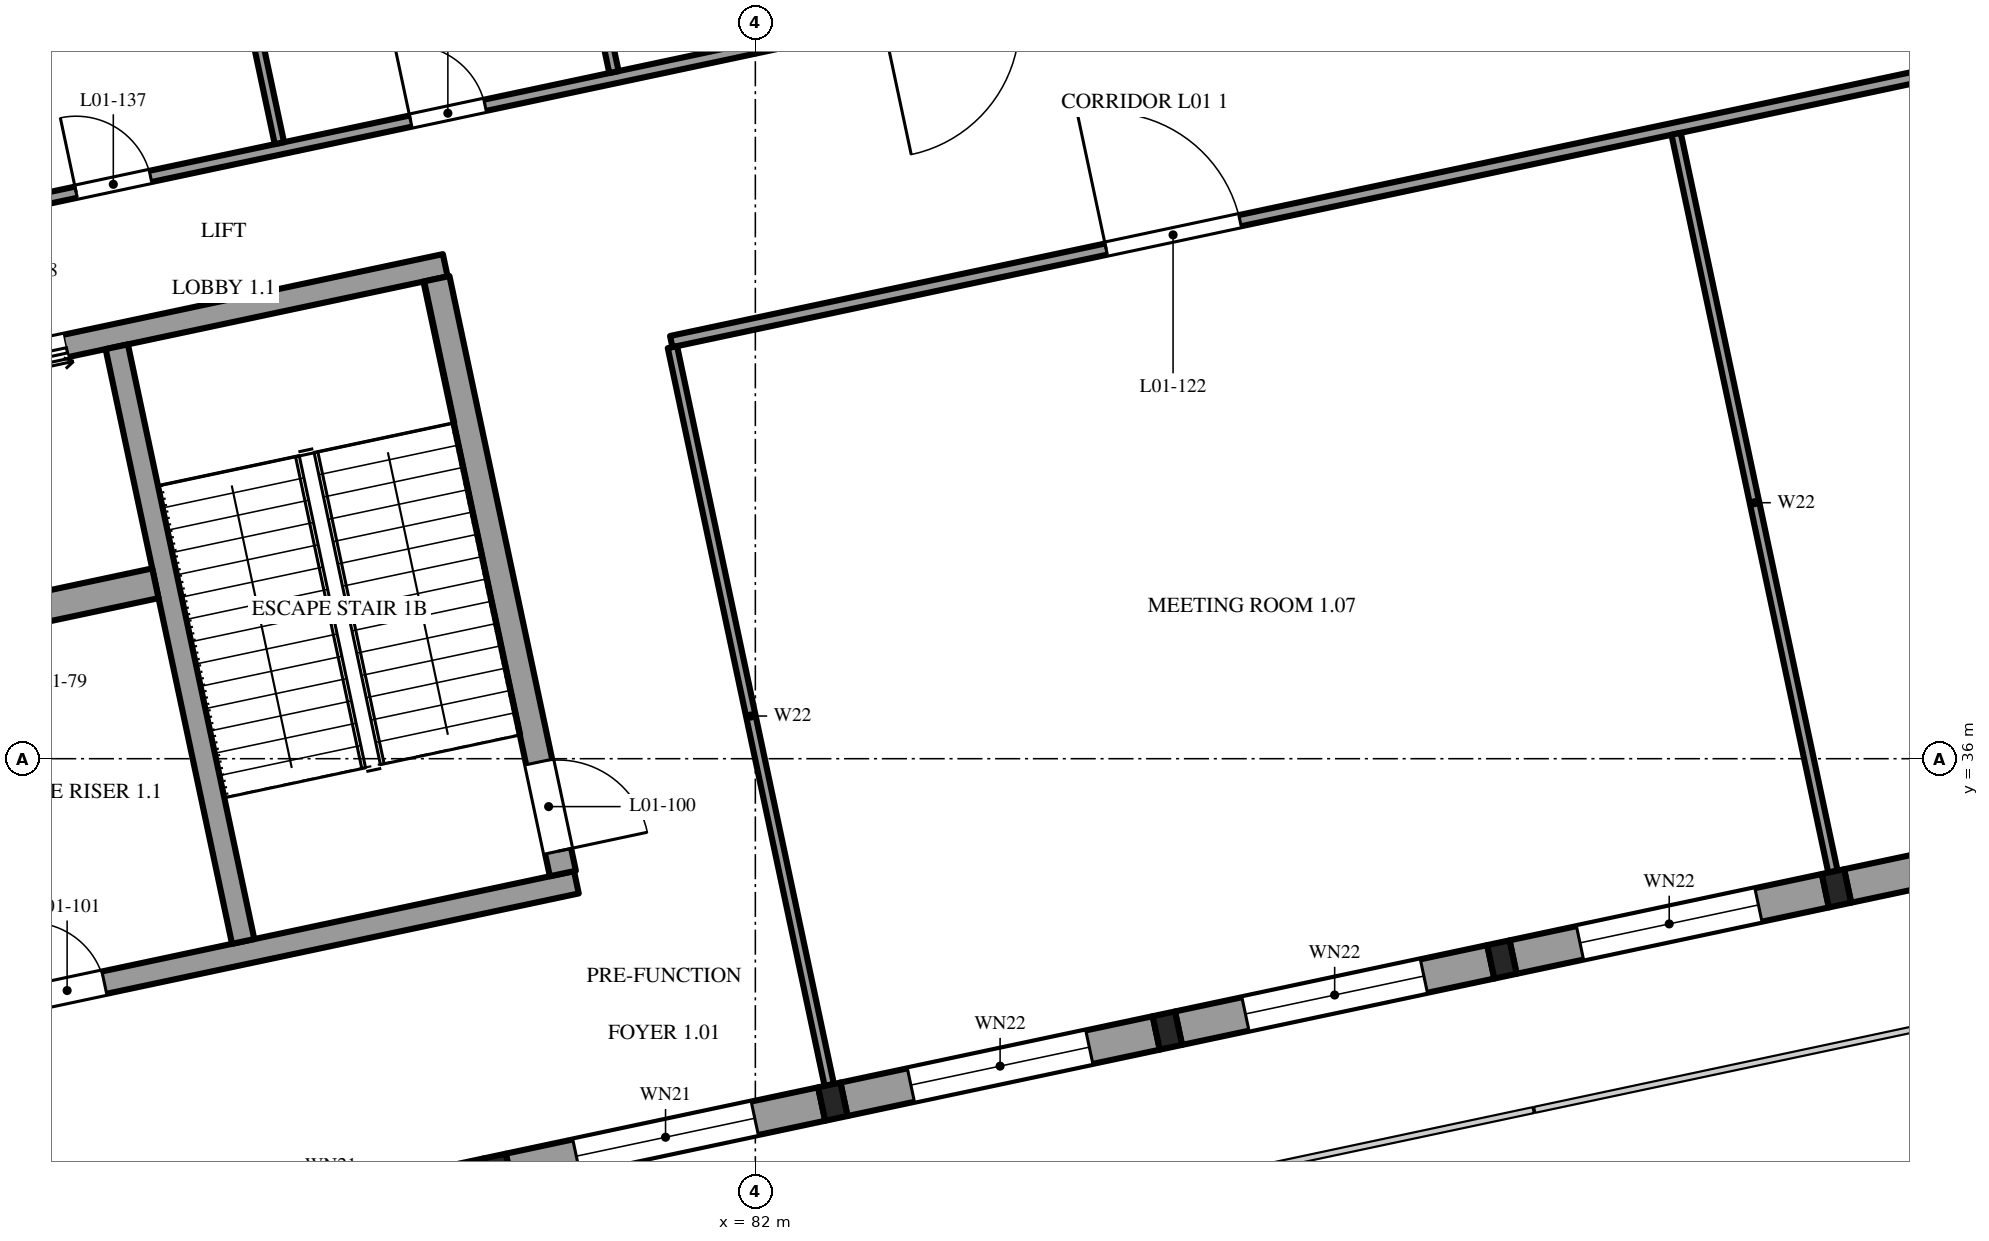
"""IFC4 building model, lengths in metres.
Left out: names, types, materials, properties, quantities, classifications, styles, units other than length and angle.
Written with IfcOpenShell. Run it as: python <this file> out.ifc"""

import sys

from ifc_helpers import new_model, si_unit, direction, frame, frame_2d, origin, origin_2d, place, context, subcontext, project, spatial, rectangle, i_section, extrude, element, fill, save


model = new_model("IFC4")
c1 = context("Model", 3, precision=1e-05, world=origin(), true_north=direction((0.0, 1.0)))
c2 = subcontext(c1, "Body", "Model", "MODEL_VIEW")
j1 = project(units=[si_unit("LENGTHUNIT", "METRE"), si_unit("PLANEANGLEUNIT", "RADIAN")], contexts=[c1])
p1 = place(None, origin())
s1 = spatial("IfcSite", under=j1, at=p1, CompositionType="ELEMENT")
p2 = place(p1, origin())
s2 = spatial("IfcBuilding", under=s1, at=p2, CompositionType="ELEMENT")
p3 = place(p2, frame((0.0, 0.0, 7.2)))
s3 = spatial("IfcBuildingStorey", under=s2, at=p3, CompositionType="ELEMENT", Elevation=7.2)
for number, where, z_axis, x_axis in (
    (1, (78.618, 30.552, 0.0), (0.0, 0.0, 1.0), (0.978, 0.208, 0.0)),
    (2, (83.019, 31.487, 0.0), (0.0, 0.0, 1.0), (0.978, 0.208, 0.0)),
    (3, (87.421, 32.423, 0.0), (0.0, 0.0, 1.0), (0.978, 0.208, 0.0)),
    (4, (91.823, 33.358, 0.0), (0.0, 0.0, 1.0), (0.978, 0.208, 0.0)),
    (5, (96.224, 34.294, 0.0), (0.0, 0.0, 1.0), (0.978, 0.208, 0.0)),
):
    element("IfcColumn", number, at=place(p3, frame(where, z_axis=z_axis, x_axis=x_axis)), inside=s3, PredefinedType="COLUMN", context=c2, shape_type="SweptSolid", body=[
        extrude(i_section(OverallWidth=0.3, OverallDepth=0.45, WebThickness=0.014, FlangeThickness=0.026, FilletRadius=0.027, at=origin_2d()), origin(), (0.0, 0.0, 1.0), 4.8),
    ])
p4 = place(p3, frame((66.245, 31.525, 0.0), z_axis=(0.0, 0.0, 1.0), x_axis=(0.978147662755, 0.20791139903, 0.0)))
e6 = element("IfcWall", 6, at=p4, inside=s3, PredefinedType="SHEAR", context=c2, shape_type="SweptSolid", body=[
    extrude(rectangle(XDim=13.7, YDim=0.3, at=frame_2d((6.85, 0.0))), origin(), (0.0, 0.0, 1.0), 4.8),
])
p5 = place(p4, frame((6.35, 0.0, 0.0)))
e7 = element("IfcOpeningElement", 7, at=p5, cuts=e6, PredefinedType="OPENING", context=c2, shape_type="SweptSolid", body=[
    extrude(rectangle(XDim=1.0, YDim=2.1, at=frame_2d((0.5, 1.05))), frame((0.0, 0.16, 0.0), z_axis=(0.0, -1.0, 0.0), x_axis=(1.0, 0.0, 0.0)), (0.0, 0.0, 1.0), 0.32),
])
p6 = place(p3, frame((64.519, 39.644, 0.0), z_axis=(0.0, 0.0, 1.0), x_axis=(0.978147662755, 0.20791139903, 0.0)))
e8 = element("IfcWall", 8, at=p6, inside=s3, PredefinedType="SHEAR", context=c2, shape_type="SweptSolid", body=[
    extrude(rectangle(XDim=13.7, YDim=0.3, at=frame_2d((6.85, 0.0))), origin(), (0.0, 0.0, 1.0), 4.8),
])
p7 = place(p6, frame((5.1, 0.0, 0.0)))
e9 = element("IfcOpeningElement", 9, at=p7, cuts=e8, PredefinedType="OPENING", context=c2, shape_type="SweptSolid", body=[
    extrude(rectangle(XDim=1.1, YDim=2.1, at=frame_2d((0.55, 1.05))), frame((0.0, 0.16, 0.0), z_axis=(0.0, -1.0, 0.0), x_axis=(1.0, 0.0, 0.0)), (0.0, 0.0, 1.0), 0.32),
])
p8 = place(p6, frame((7.5, 0.0, 0.0)))
e10 = element("IfcOpeningElement", 10, at=p8, cuts=e8, PredefinedType="OPENING", context=c2, shape_type="SweptSolid", body=[
    extrude(rectangle(XDim=1.1, YDim=2.1, at=frame_2d((0.55, 1.05))), frame((0.0, 0.16, 0.0), z_axis=(0.0, -1.0, 0.0), x_axis=(1.0, 0.0, 0.0)), (0.0, 0.0, 1.0), 0.32),
])
p9 = place(p3, frame((79.468, 34.49, 0.0), z_axis=(0.0, 0.0, 1.0), x_axis=(-0.207915693476, 0.978146749934, 0.0)))
e11 = element("IfcWall", 11, at=p9, inside=s3, PredefinedType="SOLIDWALL", context=c2, shape_type="SweptSolid", body=[
    extrude(rectangle(XDim=8.0, YDim=0.35, at=frame_2d((4.0, 0.0))), origin(), (0.0, 0.0, 1.0), 4.8),
])
p10 = place(p9, frame((0.3, 0.0, 0.0)))
e12 = element("IfcOpeningElement", 12, at=p10, cuts=e11, PredefinedType="OPENING", context=c2, shape_type="SweptSolid", body=[
    extrude(rectangle(XDim=1.2, YDim=2.1, at=frame_2d((0.6, 1.05))), frame((0.0, 0.185, 0.0), z_axis=(0.0, -1.0, 0.0), x_axis=(1.0, 0.0, 0.0)), (0.0, 0.0, 1.0), 0.37),
])
p11 = place(p3, frame((75.261, 33.595, 0.0), z_axis=(0.0, 0.0, 1.0), x_axis=(-0.207915693476, 0.978146749934, 0.0)))
e13 = element("IfcWall", 13, at=p11, inside=s3, PredefinedType="SHEAR", context=c2, shape_type="SweptSolid", body=[
    extrude(rectangle(XDim=8.0, YDim=0.3, at=frame_2d((4.0, 0.0))), origin(), (0.0, 0.0, 1.0), 4.8),
])
p12 = place(p3, frame((69.705, 37.373, 0.0), z_axis=(0.0, 0.0, 1.0), x_axis=(0.978149611564, 0.20790223038, 0.0)))
e14 = element("IfcWall", 14, at=p12, inside=s3, PredefinedType="SHEAR", context=c2, shape_type="SweptSolid", body=[
    extrude(rectangle(XDim=4.5, YDim=0.4, at=frame_2d((2.25, 0.0))), origin(), (0.0, 0.0, 1.0), 4.8),
])
p13 = place(p3, frame((74.363, 29.647, 0.0), z_axis=(0.0, 0.0, 1.0), x_axis=(0.978143927149, 0.207928972925, 0.0)))
e15 = element("IfcWall", 15, at=p13, inside=s3, PredefinedType="SOLIDWALL", context=c2, shape_type="SweptSolid", body=[
    extrude(rectangle(XDim=4.2, YDim=0.45, at=frame_2d((2.1, 0.0))), origin(), (0.0, 0.0, 1.0), 4.35),
])
p14 = place(p13, frame((0.9, 0.0, 0.45)))
e16 = element("IfcOpeningElement", 16, at=p14, cuts=e15, PredefinedType="OPENING", context=c2, shape_type="SweptSolid", body=[
    extrude(rectangle(XDim=2.4, YDim=3.3, at=frame_2d((1.2, 1.65))), frame((0.0, 0.235, 0.0), z_axis=(0.0, -1.0, 0.0), x_axis=(1.0, 0.0, 0.0)), (0.0, 0.0, 1.0), 0.47),
])
p15 = place(p3, frame((78.764, 30.583, 0.0), z_axis=(0.0, 0.0, 1.0), x_axis=(0.978143927149, 0.207928972925, 0.0)))
e17 = element("IfcWall", 17, at=p15, inside=s3, PredefinedType="SOLIDWALL", context=c2, shape_type="SweptSolid", body=[
    extrude(rectangle(XDim=4.2, YDim=0.45, at=frame_2d((2.1, 0.0))), origin(), (0.0, 0.0, 1.0), 4.35),
])
p16 = place(p15, frame((0.9, 0.0, 0.45)))
e18 = element("IfcOpeningElement", 18, at=p16, cuts=e17, PredefinedType="OPENING", context=c2, shape_type="SweptSolid", body=[
    extrude(rectangle(XDim=2.4, YDim=3.3, at=frame_2d((1.2, 1.65))), frame((0.0, 0.235, 0.0), z_axis=(0.0, -1.0, 0.0), x_axis=(1.0, 0.0, 0.0)), (0.0, 0.0, 1.0), 0.47),
])
p17 = place(p3, frame((83.166, 31.519, 0.0), z_axis=(0.0, 0.0, 1.0), x_axis=(0.978155748334, 0.207873355681, 0.0)))
e19 = element("IfcWall", 19, at=p17, inside=s3, PredefinedType="SOLIDWALL", context=c2, shape_type="SweptSolid", body=[
    extrude(rectangle(XDim=4.2, YDim=0.45, at=frame_2d((2.1, 0.0))), origin(), (0.0, 0.0, 1.0), 4.35),
])
p18 = place(p17, frame((0.9, 0.0, 0.9)))
e20 = element("IfcOpeningElement", 20, at=p18, cuts=e19, PredefinedType="OPENING", context=c2, shape_type="SweptSolid", body=[
    extrude(rectangle(XDim=2.4, YDim=2.4, at=frame_2d((1.2, 1.2))), frame((0.0, 0.235, 0.0), z_axis=(0.0, -1.0, 0.0), x_axis=(1.0, 0.0, 0.0)), (0.0, 0.0, 1.0), 0.47),
])
p19 = place(p3, frame((87.568, 32.454, 0.0), z_axis=(0.0, 0.0, 1.0), x_axis=(0.97815826, 0.207861536591, 0.0)))
e21 = element("IfcWall", 21, at=p19, inside=s3, PredefinedType="SOLIDWALL", context=c2, shape_type="SweptSolid", body=[
    extrude(rectangle(XDim=4.2, YDim=0.45, at=frame_2d((2.1, 0.0))), origin(), (0.0, 0.0, 1.0), 4.35),
])
p20 = place(p19, frame((0.9, 0.0, 0.9)))
e22 = element("IfcOpeningElement", 22, at=p20, cuts=e21, PredefinedType="OPENING", context=c2, shape_type="SweptSolid", body=[
    extrude(rectangle(XDim=2.4, YDim=2.4, at=frame_2d((1.2, 1.2))), frame((0.0, 0.235, 0.0), z_axis=(0.0, -1.0, 0.0), x_axis=(1.0, 0.0, 0.0)), (0.0, 0.0, 1.0), 0.47),
])
p21 = place(p3, frame((91.969, 33.39, 0.0), z_axis=(0.0, 0.0, 1.0), x_axis=(0.978143927149, 0.207928972925, 0.0)))
e23 = element("IfcWall", 23, at=p21, inside=s3, PredefinedType="SOLIDWALL", context=c2, shape_type="SweptSolid", body=[
    extrude(rectangle(XDim=4.2, YDim=0.45, at=frame_2d((2.1, 0.0))), origin(), (0.0, 0.0, 1.0), 4.35),
])
p22 = place(p21, frame((0.9, 0.0, 0.9)))
e24 = element("IfcOpeningElement", 24, at=p22, cuts=e23, PredefinedType="OPENING", context=c2, shape_type="SweptSolid", body=[
    extrude(rectangle(XDim=2.4, YDim=2.4, at=frame_2d((1.2, 1.2))), frame((0.0, 0.235, 0.0), z_axis=(0.0, -1.0, 0.0), x_axis=(1.0, 0.0, 0.0)), (0.0, 0.0, 1.0), 0.47),
])
p23 = place(p3, frame((96.371, 34.325, 0.0), z_axis=(0.0, 0.0, 1.0), x_axis=(0.978143927149, 0.207928972925, 0.0)))
e25 = element("IfcWall", 25, at=p23, inside=s3, PredefinedType="SOLIDWALL", context=c2, shape_type="SweptSolid", body=[
    extrude(rectangle(XDim=4.2, YDim=0.45, at=frame_2d((2.1, 0.0))), origin(), (0.0, 0.0, 1.0), 4.35),
])
p24 = place(p23, frame((0.9, 0.0, 0.9)))
e26 = element("IfcOpeningElement", 26, at=p24, cuts=e25, PredefinedType="OPENING", context=c2, shape_type="SweptSolid", body=[
    extrude(rectangle(XDim=2.4, YDim=2.4, at=frame_2d((1.2, 1.2))), frame((0.0, 0.235, 0.0), z_axis=(0.0, -1.0, 0.0), x_axis=(1.0, 0.0, 0.0)), (0.0, 0.0, 1.0), 0.47),
])
p25 = place(p3, frame((80.893, 41.489, 0.0), z_axis=(0.0, 0.0, 1.0), x_axis=(0.97814724207, 0.20791337819, 0.0)))
e27 = element("IfcWall", 27, at=p25, inside=s3, PredefinedType="PARTITIONING", context=c2, shape_type="SweptSolid", body=[
    extrude(rectangle(XDim=49.5, YDim=0.15, at=frame_2d((24.75, 0.0))), origin(), (0.0, 0.0, 1.0), 3.75),
])
p26 = place(p25, frame((5.85, 0.0, 0.0)))
e28 = element("IfcOpeningElement", 28, at=p26, cuts=e27, PredefinedType="OPENING", context=c2, shape_type="SweptSolid", body=[
    extrude(rectangle(XDim=1.8, YDim=2.1, at=frame_2d((0.9, 1.05))), frame((0.0, 0.085, 0.0), z_axis=(0.0, -1.0, 0.0), x_axis=(1.0, 0.0, 0.0)), (0.0, 0.0, 1.0), 0.17),
])
p27 = place(p25, frame((17.1, 0.0, 0.0)))
e29 = element("IfcOpeningElement", 29, at=p27, cuts=e27, PredefinedType="OPENING", context=c2, shape_type="SweptSolid", body=[
    extrude(rectangle(XDim=1.8, YDim=2.1, at=frame_2d((0.9, 1.05))), frame((0.0, 0.085, 0.0), z_axis=(0.0, -1.0, 0.0), x_axis=(1.0, 0.0, 0.0)), (0.0, 0.0, 1.0), 0.17),
])
p28 = place(p25, frame((26.1, 0.0, 0.0)))
e30 = element("IfcOpeningElement", 30, at=p28, cuts=e27, PredefinedType="OPENING", context=c2, shape_type="SweptSolid", body=[
    extrude(rectangle(XDim=1.8, YDim=2.1, at=frame_2d((0.9, 1.05))), frame((0.0, 0.085, 0.0), z_axis=(0.0, -1.0, 0.0), x_axis=(1.0, 0.0, 0.0)), (0.0, 0.0, 1.0), 0.17),
])
p29 = place(p25, frame((33.25, 0.0, 0.0)))
e31 = element("IfcOpeningElement", 31, at=p29, cuts=e27, PredefinedType="OPENING", context=c2, shape_type="SweptSolid", body=[
    extrude(rectangle(XDim=1.0, YDim=2.1, at=frame_2d((0.5, 1.05))), frame((0.0, 0.085, 0.0), z_axis=(0.0, -1.0, 0.0), x_axis=(1.0, 0.0, 0.0)), (0.0, 0.0, 1.0), 0.17),
])
p30 = place(p25, frame((41.7, 0.0, 0.0)))
e32 = element("IfcOpeningElement", 32, at=p30, cuts=e27, PredefinedType="OPENING", context=c2, shape_type="SweptSolid", body=[
    extrude(rectangle(XDim=2.1, YDim=2.4, at=frame_2d((1.05, 1.2))), frame((0.0, 0.085, 0.0), z_axis=(0.0, -1.0, 0.0), x_axis=(1.0, 0.0, 0.0)), (0.0, 0.0, 1.0), 0.17),
])
p31 = place(p3, frame((82.972, 31.707, 0.0), z_axis=(0.0, 0.0, 1.0), x_axis=(-0.207904355568, 0.978149159861, 0.0)))
e33 = element("IfcWall", 33, at=p31, inside=s3, PredefinedType="PARTITIONING", context=c2, shape_type="SweptSolid", body=[
    extrude(rectangle(XDim=9.925, YDim=0.125, at=frame_2d((4.962, 0.0))), origin(), (0.0, 0.0, 1.0), 3.75),
])
p32 = place(p3, frame((96.177, 34.514, 0.0), z_axis=(0.0, 0.0, 1.0), x_axis=(-0.20790935802, 0.978148096582, 0.0)))
e34 = element("IfcWall", 34, at=p32, inside=s3, PredefinedType="PARTITIONING", context=c2, shape_type="SweptSolid", body=[
    extrude(rectangle(XDim=9.925, YDim=0.125, at=frame_2d((4.962, 0.0))), origin(), (0.0, 0.0, 1.0), 3.75),
])
p33 = place(p3, frame((59.663, 40.605, 0.0), z_axis=(0.0, 0.0, 1.0), x_axis=(0.978147466509, 0.207912322295, 0.0)))
e35 = element("IfcWall", 35, at=p33, inside=s3, PredefinedType="PARTITIONING", context=c2, shape_type="SweptSolid", body=[
    extrude(rectangle(XDim=34.45, YDim=0.15, at=frame_2d((17.225, 0.0))), origin(), (0.0, 0.0, 1.0), 3.75),
])
p34 = place(p33, frame((2.975, 0.0, 0.0)))
e36 = element("IfcOpeningElement", 36, at=p34, cuts=e35, PredefinedType="OPENING", context=c2, shape_type="SweptSolid", body=[
    extrude(rectangle(XDim=1.5, YDim=2.1, at=frame_2d((0.75, 1.05))), frame((0.0, 0.085, 0.0), z_axis=(0.0, -1.0, 0.0), x_axis=(1.0, 0.0, 0.0)), (0.0, 0.0, 1.0), 0.17),
])
p35 = place(p33, frame((9.2, 0.0, 0.0)))
e37 = element("IfcOpeningElement", 37, at=p35, cuts=e35, PredefinedType="OPENING", context=c2, shape_type="SweptSolid", body=[
    extrude(rectangle(XDim=1.0, YDim=2.1, at=frame_2d((0.5, 1.05))), frame((0.0, 0.085, 0.0), z_axis=(0.0, -1.0, 0.0), x_axis=(1.0, 0.0, 0.0)), (0.0, 0.0, 1.0), 0.17),
])
p36 = place(p33, frame((13.7, 0.0, 0.0)))
e38 = element("IfcOpeningElement", 38, at=p36, cuts=e35, PredefinedType="OPENING", context=c2, shape_type="SweptSolid", body=[
    extrude(rectangle(XDim=1.0, YDim=2.1, at=frame_2d((0.5, 1.05))), frame((0.0, 0.085, 0.0), z_axis=(0.0, -1.0, 0.0), x_axis=(1.0, 0.0, 0.0)), (0.0, 0.0, 1.0), 0.17),
])
p37 = place(p33, frame((18.2, 0.0, 0.0)))
e39 = element("IfcOpeningElement", 39, at=p37, cuts=e35, PredefinedType="OPENING", context=c2, shape_type="SweptSolid", body=[
    extrude(rectangle(XDim=1.0, YDim=2.1, at=frame_2d((0.5, 1.05))), frame((0.0, 0.085, 0.0), z_axis=(0.0, -1.0, 0.0), x_axis=(1.0, 0.0, 0.0)), (0.0, 0.0, 1.0), 0.17),
])
p38 = place(p33, frame((24.55, 0.0, 0.0)))
e40 = element("IfcOpeningElement", 40, at=p38, cuts=e35, PredefinedType="OPENING", context=c2, shape_type="SweptSolid", body=[
    extrude(rectangle(XDim=1.8, YDim=2.1, at=frame_2d((0.9, 1.05))), frame((0.0, 0.085, 0.0), z_axis=(0.0, -1.0, 0.0), x_axis=(1.0, 0.0, 0.0)), (0.0, 0.0, 1.0), 0.17),
])
p39 = place(p33, frame((31.7, 0.0, 0.0)))
e41 = element("IfcOpeningElement", 41, at=p39, cuts=e35, PredefinedType="OPENING", context=c2, shape_type="SweptSolid", body=[
    extrude(rectangle(XDim=1.0, YDim=2.1, at=frame_2d((0.5, 1.05))), frame((0.0, 0.085, 0.0), z_axis=(0.0, -1.0, 0.0), x_axis=(1.0, 0.0, 0.0)), (0.0, 0.0, 1.0), 0.17),
])
p40 = place(p3, frame((73.675, 53.807, 0.0), z_axis=(0.0, 0.0, 1.0), x_axis=(0.207904355568, -0.978149159861, 0.0)))
e42 = element("IfcWall", 42, at=p40, inside=s3, PredefinedType="PARTITIONING", context=c2, shape_type="SweptSolid", body=[
    extrude(rectangle(XDim=9.925, YDim=0.125, at=frame_2d((4.962, 0.0))), origin(), (0.0, 0.0, 1.0), 3.75),
])
p41 = place(p3, frame((78.076, 54.743, 0.0), z_axis=(0.0, 0.0, 1.0), x_axis=(0.20790935802, -0.978148096582, 0.0)))
e43 = element("IfcWall", 43, at=p41, inside=s3, PredefinedType="PARTITIONING", context=c2, shape_type="SweptSolid", body=[
    extrude(rectangle(XDim=9.925, YDim=0.125, at=frame_2d((4.962, 0.0))), origin(), (0.0, 0.0, 1.0), 3.75),
])
p42 = place(p16, origin())
e44 = element("IfcWindow", 44, at=p42, inside=s3, PartitioningType="DOUBLE_PANEL_VERTICAL", PredefinedType="WINDOW", context=c2, shape_type="SweptSolid", body=[
    extrude(rectangle(XDim=2.4, YDim=3.3, at=frame_2d((1.2, 1.65))), frame((0.0, 0.03, 0.0), z_axis=(0.0, -1.0, 0.0), x_axis=(1.0, 0.0, 0.0)), (0.0, 0.0, 1.0), 0.06),
])
fill(e18, e44)
p43 = place(p18, origin())
e45 = element("IfcWindow", 45, at=p43, inside=s3, PartitioningType="SINGLE_PANEL", PredefinedType="WINDOW", context=c2, shape_type="SweptSolid", body=[
    extrude(rectangle(XDim=2.4, YDim=2.4, at=frame_2d((1.2, 1.2))), frame((0.0, 0.03, 0.0), z_axis=(0.0, -1.0, 0.0), x_axis=(1.0, 0.0, 0.0)), (0.0, 0.0, 1.0), 0.06),
])
fill(e20, e45)
p44 = place(p20, origin())
e46 = element("IfcWindow", 46, at=p44, inside=s3, PartitioningType="SINGLE_PANEL", PredefinedType="WINDOW", context=c2, shape_type="SweptSolid", body=[
    extrude(rectangle(XDim=2.4, YDim=2.4, at=frame_2d((1.2, 1.2))), frame((0.0, 0.03, 0.0), z_axis=(0.0, -1.0, 0.0), x_axis=(1.0, 0.0, 0.0)), (0.0, 0.0, 1.0), 0.06),
])
fill(e22, e46)
p45 = place(p22, origin())
e47 = element("IfcWindow", 47, at=p45, inside=s3, PartitioningType="SINGLE_PANEL", PredefinedType="WINDOW", context=c2, shape_type="SweptSolid", body=[
    extrude(rectangle(XDim=2.4, YDim=2.4, at=frame_2d((1.2, 1.2))), frame((0.0, 0.03, 0.0), z_axis=(0.0, -1.0, 0.0), x_axis=(1.0, 0.0, 0.0)), (0.0, 0.0, 1.0), 0.06),
])
fill(e24, e47)
p46 = place(p8, origin())
e48 = element("IfcDoor", 48, at=p46, inside=s3, OperationType="DOUBLE_DOOR_SLIDING", PredefinedType="DOOR", context=c2, shape_type="SweptSolid", body=[
    extrude(rectangle(XDim=1.1, YDim=2.1, at=frame_2d((0.55, 1.05))), frame((0.0, 0.025, 0.0), z_axis=(0.0, -1.0, 0.0), x_axis=(1.0, 0.0, 0.0)), (0.0, 0.0, 1.0), 0.05),
])
fill(e10, e48)
p47 = place(p10, frame((1.2, 0.0, 0.0), z_axis=(0.0, 0.0, 1.0), x_axis=(-1.0, 0.0, 0.0)))
e49 = element("IfcDoor", 49, at=p47, inside=s3, OperationType="SINGLE_SWING_LEFT", PredefinedType="DOOR", context=c2, shape_type="SweptSolid", body=[
    extrude(rectangle(XDim=1.2, YDim=2.1, at=frame_2d((0.6, 1.05))), frame((0.0, 0.025, 0.0), z_axis=(0.0, -1.0, 0.0), x_axis=(1.0, 0.0, 0.0)), (0.0, 0.0, 1.0), 0.05),
])
fill(e12, e49)
p48 = place(p5, origin())
e50 = element("IfcDoor", 50, at=p48, inside=s3, OperationType="SINGLE_SWING_RIGHT", PredefinedType="DOOR", context=c2, shape_type="SweptSolid", body=[
    extrude(rectangle(XDim=1.0, YDim=2.1, at=frame_2d((0.5, 1.05))), frame((0.0, 0.025, 0.0), z_axis=(0.0, -1.0, 0.0), x_axis=(1.0, 0.0, 0.0)), (0.0, 0.0, 1.0), 0.05),
])
fill(e7, e50)
p49 = place(p26, origin())
e51 = element("IfcDoor", 51, at=p49, inside=s3, OperationType="DOUBLE_DOOR_SINGLE_SWING", PredefinedType="DOOR", context=c2, shape_type="SweptSolid", body=[
    extrude(rectangle(XDim=1.8, YDim=2.1, at=frame_2d((0.9, 1.05))), frame((0.0, 0.025, 0.0), z_axis=(0.0, -1.0, 0.0), x_axis=(1.0, 0.0, 0.0)), (0.0, 0.0, 1.0), 0.05),
])
fill(e28, e51)
p50 = place(p36, origin())
e52 = element("IfcDoor", 52, at=p50, inside=s3, OperationType="SINGLE_SWING_RIGHT", PredefinedType="DOOR", context=c2, shape_type="SweptSolid", body=[
    extrude(rectangle(XDim=1.0, YDim=2.1, at=frame_2d((0.5, 1.05))), frame((0.0, 0.025, 0.0), z_axis=(0.0, -1.0, 0.0), x_axis=(1.0, 0.0, 0.0)), (0.0, 0.0, 1.0), 0.05),
])
fill(e38, e52)
p51 = place(p37, origin())
e53 = element("IfcDoor", 53, at=p51, inside=s3, OperationType="SINGLE_SWING_LEFT", PredefinedType="DOOR", context=c2, shape_type="SweptSolid", body=[
    extrude(rectangle(XDim=1.0, YDim=2.1, at=frame_2d((0.5, 1.05))), frame((0.0, 0.025, 0.0), z_axis=(0.0, -1.0, 0.0), x_axis=(1.0, 0.0, 0.0)), (0.0, 0.0, 1.0), 0.05),
])
fill(e39, e53)
save(model, sys.argv[1])
